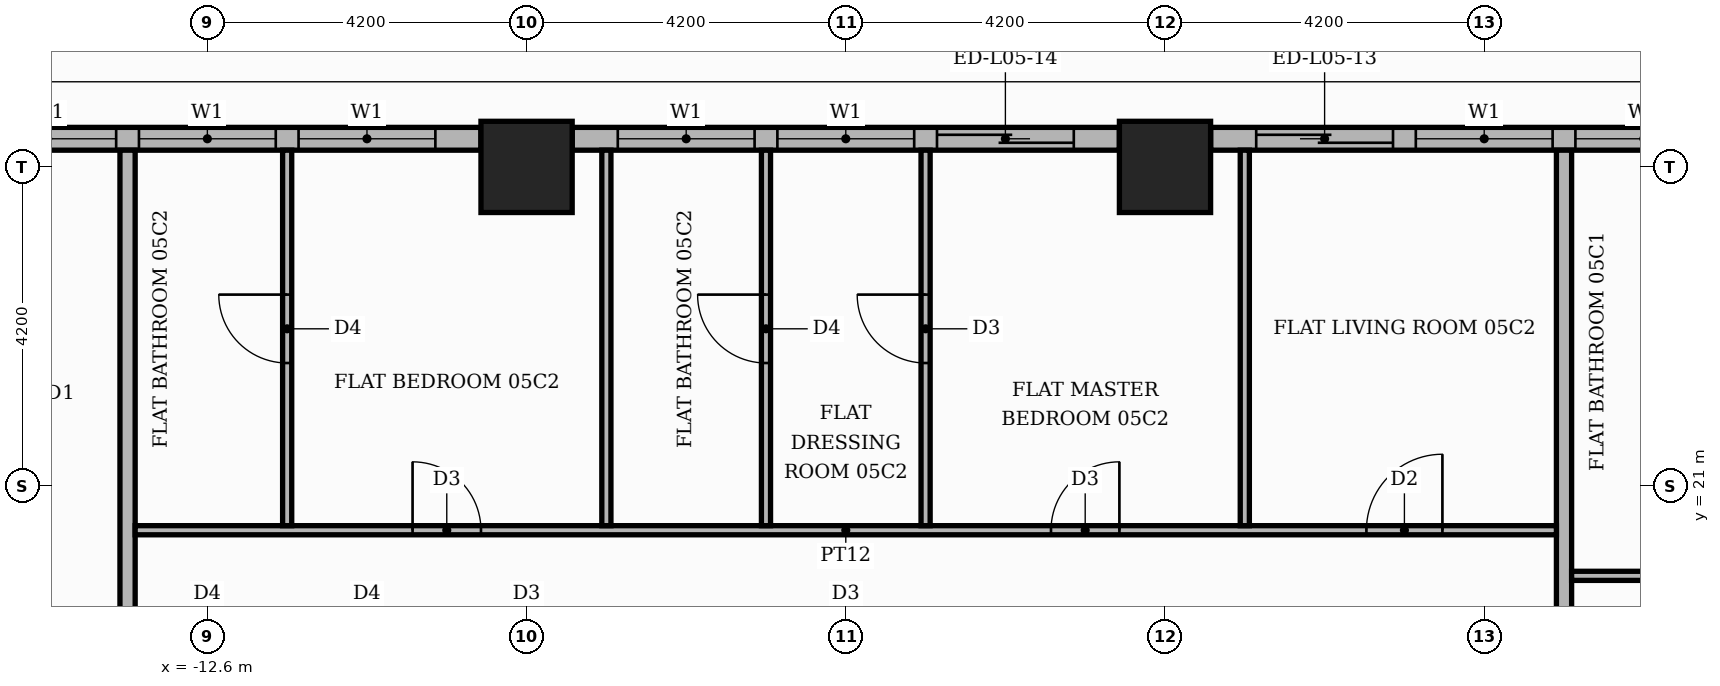
"""IFC4 building model, lengths in metres.
Left out: names, types, materials, properties, quantities, classifications, styles, units other than length and angle.
Written with IfcOpenShell. Run it as: python <this file> out.ifc"""

import sys

from ifc_helpers import new_model, si_unit, direction, frame, frame_2d, origin, origin_2d, place, context, subcontext, project, spatial, rectangle, extrude, element, fill, save


model = new_model("IFC4")
c1 = context("Model", 3, precision=1e-05, world=origin(), true_north=direction((0.0, 1.0)))
c2 = subcontext(c1, "Body", "Model", "MODEL_VIEW")
j1 = project(units=[si_unit("LENGTHUNIT", "METRE"), si_unit("PLANEANGLEUNIT", "RADIAN")], contexts=[c1])
p1 = place(None, origin())
s1 = spatial("IfcSite", under=j1, at=p1, CompositionType="ELEMENT")
p2 = place(p1, origin())
s2 = spatial("IfcBuilding", under=s1, at=p2, CompositionType="ELEMENT")
p3 = place(p2, frame((0.0, 0.0, 27.0)))
s3 = spatial("IfcBuildingStorey", under=s2, at=p3, CompositionType="ELEMENT", Elevation=27.0)
for number, where, z_axis, x_axis in (
    (1, (0.0, 25.2, 0.0), (0.0, 0.0, 1.0), (1.0, 0.0, 0.0)),
    (2, (-8.4, 25.2, 0.0), (0.0, 0.0, 1.0), (1.0, 0.0, 0.0)),
):
    element("IfcColumn", number, at=place(p3, frame(where, z_axis=z_axis, x_axis=x_axis)), inside=s3, PredefinedType="COLUMN", context=c2, shape_type="SweptSolid", body=[
        extrude(rectangle(XDim=1.2, YDim=1.2, at=origin_2d()), origin(), (0.0, 0.0, 1.0), 3.9),
    ])
p4 = place(p3, frame((7.8, 25.57, 0.0), z_axis=(0.0, 0.0, 1.0), x_axis=(-1.0, 0.0, 0.0)))
e3 = element("IfcWall", 3, at=p4, inside=s3, PredefinedType="STANDARD", context=c2, shape_type="SweptSolid", body=[
    extrude(rectangle(XDim=7.2, YDim=0.3, at=frame_2d((3.6, 0.0))), origin(), (0.0, 0.0, 1.0), 3.48),
])
p5 = place(p4, frame((0.6, 0.0, 0.9)))
e4 = element("IfcOpeningElement", 4, at=p5, cuts=e3, PredefinedType="OPENING", context=c2, shape_type="SweptSolid", body=[
    extrude(rectangle(XDim=1.8, YDim=2.1, at=frame_2d((0.9, 1.05))), frame((0.0, 0.16, 0.0), z_axis=(0.0, -1.0, 0.0), x_axis=(1.0, 0.0, 0.0)), (0.0, 0.0, 1.0), 0.32),
])
p6 = place(p4, frame((2.7, 0.0, 0.9)))
e5 = element("IfcOpeningElement", 5, at=p6, cuts=e3, PredefinedType="OPENING", context=c2, shape_type="SweptSolid", body=[
    extrude(rectangle(XDim=1.8, YDim=2.1, at=frame_2d((0.9, 1.05))), frame((0.0, 0.16, 0.0), z_axis=(0.0, -1.0, 0.0), x_axis=(1.0, 0.0, 0.0)), (0.0, 0.0, 1.0), 0.32),
])
p7 = place(p4, frame((4.8, 0.0, 0.0)))
e6 = element("IfcOpeningElement", 6, at=p7, cuts=e3, PredefinedType="OPENING", context=c2, shape_type="SweptSolid", body=[
    extrude(rectangle(XDim=1.8, YDim=2.4, at=frame_2d((0.9, 1.2))), frame((0.0, 0.16, 0.0), z_axis=(0.0, -1.0, 0.0), x_axis=(1.0, 0.0, 0.0)), (0.0, 0.0, 1.0), 0.32),
])
p8 = place(p3, frame((-0.6, 25.57, 0.0), z_axis=(0.0, 0.0, 1.0), x_axis=(-1.0, 0.0, 0.0)))
e7 = element("IfcWall", 7, at=p8, inside=s3, PredefinedType="STANDARD", context=c2, shape_type="SweptSolid", body=[
    extrude(rectangle(XDim=7.2, YDim=0.3, at=frame_2d((3.6, 0.0))), origin(), (0.0, 0.0, 1.0), 3.48),
])
p9 = place(p8, frame((0.6, 0.0, 0.0)))
e8 = element("IfcOpeningElement", 8, at=p9, cuts=e7, PredefinedType="OPENING", context=c2, shape_type="SweptSolid", body=[
    extrude(rectangle(XDim=1.8, YDim=2.4, at=frame_2d((0.9, 1.2))), frame((0.0, 0.16, 0.0), z_axis=(0.0, -1.0, 0.0), x_axis=(1.0, 0.0, 0.0)), (0.0, 0.0, 1.0), 0.32),
])
p10 = place(p8, frame((2.7, 0.0, 0.9)))
e9 = element("IfcOpeningElement", 9, at=p10, cuts=e7, PredefinedType="OPENING", context=c2, shape_type="SweptSolid", body=[
    extrude(rectangle(XDim=1.8, YDim=2.1, at=frame_2d((0.9, 1.05))), frame((0.0, 0.16, 0.0), z_axis=(0.0, -1.0, 0.0), x_axis=(1.0, 0.0, 0.0)), (0.0, 0.0, 1.0), 0.32),
])
p11 = place(p8, frame((4.8, 0.0, 0.9)))
e10 = element("IfcOpeningElement", 10, at=p11, cuts=e7, PredefinedType="OPENING", context=c2, shape_type="SweptSolid", body=[
    extrude(rectangle(XDim=1.8, YDim=2.1, at=frame_2d((0.9, 1.05))), frame((0.0, 0.16, 0.0), z_axis=(0.0, -1.0, 0.0), x_axis=(1.0, 0.0, 0.0)), (0.0, 0.0, 1.0), 0.32),
])
p12 = place(p3, frame((-9.0, 25.57, 0.0), z_axis=(0.0, 0.0, 1.0), x_axis=(-1.0, 0.0, 0.0)))
e11 = element("IfcWall", 11, at=p12, inside=s3, PredefinedType="STANDARD", context=c2, shape_type="SweptSolid", body=[
    extrude(rectangle(XDim=7.2, YDim=0.3, at=frame_2d((3.6, 0.0))), origin(), (0.0, 0.0, 1.0), 3.48),
])
p13 = place(p12, frame((0.6, 0.0, 0.9)))
e12 = element("IfcOpeningElement", 12, at=p13, cuts=e11, PredefinedType="OPENING", context=c2, shape_type="SweptSolid", body=[
    extrude(rectangle(XDim=1.8, YDim=2.1, at=frame_2d((0.9, 1.05))), frame((0.0, 0.16, 0.0), z_axis=(0.0, -1.0, 0.0), x_axis=(1.0, 0.0, 0.0)), (0.0, 0.0, 1.0), 0.32),
])
p14 = place(p12, frame((2.7, 0.0, 0.9)))
e13 = element("IfcOpeningElement", 13, at=p14, cuts=e11, PredefinedType="OPENING", context=c2, shape_type="SweptSolid", body=[
    extrude(rectangle(XDim=1.8, YDim=2.1, at=frame_2d((0.9, 1.05))), frame((0.0, 0.16, 0.0), z_axis=(0.0, -1.0, 0.0), x_axis=(1.0, 0.0, 0.0)), (0.0, 0.0, 1.0), 0.32),
])
p15 = place(p12, frame((4.8, 0.0, 0.9)))
e14 = element("IfcOpeningElement", 14, at=p15, cuts=e11, PredefinedType="OPENING", context=c2, shape_type="SweptSolid", body=[
    extrude(rectangle(XDim=1.8, YDim=2.1, at=frame_2d((0.9, 1.05))), frame((0.0, 0.16, 0.0), z_axis=(0.0, -1.0, 0.0), x_axis=(1.0, 0.0, 0.0)), (0.0, 0.0, 1.0), 0.32),
])
for number, where, z_axis, x_axis in (
    (15, (-13.65, 13.75, 0.0), (0.0, 0.0, 1.0), (0.0, 1.0, 0.0)),
    (16, (5.25, 13.75, 0.0), (0.0, 0.0, 1.0), (0.0, 1.0, 0.0)),
):
    element("IfcWall", number, at=place(p3, frame(where, z_axis=z_axis, x_axis=x_axis)), inside=s3, PredefinedType="PARTITIONING", context=c2, shape_type="SweptSolid", body=[
        extrude(rectangle(XDim=11.67, YDim=0.2, at=frame_2d((5.835, 0.0))), origin(), (0.0, 0.0, 1.0), 3.48),
    ])
p16 = place(p3, frame((5.35, 19.82, 0.0), z_axis=(0.0, 0.0, 1.0), x_axis=(1.0, 0.0, 0.0)))
e17 = element("IfcWall", 17, at=p16, inside=s3, PredefinedType="PARTITIONING", context=c2, shape_type="SweptSolid", body=[
    extrude(rectangle(XDim=11.95, YDim=0.12, at=frame_2d((5.975, 0.0))), origin(), (0.0, 0.0, 1.0), 3.48),
])
p17 = place(p16, frame((8.85, 0.0, 0.0)))
e18 = element("IfcOpeningElement", 18, at=p17, cuts=e17, PredefinedType="OPENING", context=c2, shape_type="SweptSolid", body=[
    extrude(rectangle(XDim=1.0, YDim=2.1, at=frame_2d((0.5, 1.05))), frame((0.0, 0.07, 0.0), z_axis=(0.0, -1.0, 0.0), x_axis=(1.0, 0.0, 0.0)), (0.0, 0.0, 1.0), 0.14),
])
p18 = place(p16, frame((5.75, 0.0, 0.0)))
e19 = element("IfcOpeningElement", 19, at=p18, cuts=e17, PredefinedType="OPENING", context=c2, shape_type="SweptSolid", body=[
    extrude(rectangle(XDim=0.9, YDim=2.1, at=frame_2d((0.45, 1.05))), frame((0.0, 0.07, 0.0), z_axis=(0.0, -1.0, 0.0), x_axis=(1.0, 0.0, 0.0)), (0.0, 0.0, 1.0), 0.14),
])
p19 = place(p3, frame((-13.55, 20.42, 0.0), z_axis=(0.0, 0.0, 1.0), x_axis=(1.0, 0.0, 0.0)))
e20 = element("IfcWall", 20, at=p19, inside=s3, PredefinedType="PARTITIONING", context=c2, shape_type="SweptSolid", body=[
    extrude(rectangle(XDim=18.7, YDim=0.12, at=frame_2d((9.35, 0.0))), origin(), (0.0, 0.0, 1.0), 3.48),
])
p20 = place(p19, frame((16.2, 0.0, 0.0)))
e21 = element("IfcOpeningElement", 21, at=p20, cuts=e20, PredefinedType="OPENING", context=c2, shape_type="SweptSolid", body=[
    extrude(rectangle(XDim=1.0, YDim=2.1, at=frame_2d((0.5, 1.05))), frame((0.0, 0.07, 0.0), z_axis=(0.0, -1.0, 0.0), x_axis=(1.0, 0.0, 0.0)), (0.0, 0.0, 1.0), 0.14),
])
p21 = place(p19, frame((12.05, 0.0, 0.0)))
e22 = element("IfcOpeningElement", 22, at=p21, cuts=e20, PredefinedType="OPENING", context=c2, shape_type="SweptSolid", body=[
    extrude(rectangle(XDim=0.9, YDim=2.1, at=frame_2d((0.45, 1.05))), frame((0.0, 0.07, 0.0), z_axis=(0.0, -1.0, 0.0), x_axis=(1.0, 0.0, 0.0)), (0.0, 0.0, 1.0), 0.14),
])
p22 = place(p19, frame((3.65, 0.0, 0.0)))
e23 = element("IfcOpeningElement", 23, at=p22, cuts=e20, PredefinedType="OPENING", context=c2, shape_type="SweptSolid", body=[
    extrude(rectangle(XDim=0.9, YDim=2.1, at=frame_2d((0.45, 1.05))), frame((0.0, 0.07, 0.0), z_axis=(0.0, -1.0, 0.0), x_axis=(1.0, 0.0, 0.0)), (0.0, 0.0, 1.0), 0.14),
])
p23 = place(p3, frame((-11.55, 20.48, 0.0), z_axis=(0.0, 0.0, 1.0), x_axis=(0.0, 1.0, 0.0)))
e24 = element("IfcWall", 24, at=p23, inside=s3, PredefinedType="PARTITIONING", context=c2, shape_type="SweptSolid", body=[
    extrude(rectangle(XDim=4.94, YDim=0.12, at=frame_2d((2.47, 0.0))), origin(), (0.0, 0.0, 1.0), 3.48),
])
p24 = place(p23, frame((2.14, 0.0, 0.0)))
e25 = element("IfcOpeningElement", 25, at=p24, cuts=e24, PredefinedType="OPENING", context=c2, shape_type="SweptSolid", body=[
    extrude(rectangle(XDim=0.9, YDim=2.1, at=frame_2d((0.45, 1.05))), frame((0.0, 0.07, 0.0), z_axis=(0.0, -1.0, 0.0), x_axis=(1.0, 0.0, 0.0)), (0.0, 0.0, 1.0), 0.14),
])
p25 = place(p3, frame((-7.35, 20.48, 0.0), z_axis=(0.0, 0.0, 1.0), x_axis=(0.0, 1.0, 0.0)))
e26 = element("IfcWall", 26, at=p25, inside=s3, PredefinedType="PARTITIONING", context=c2, shape_type="SweptSolid", body=[
    extrude(rectangle(XDim=4.94, YDim=0.12, at=frame_2d((2.47, 0.0))), origin(), (0.0, 0.0, 1.0), 3.48),
])
p26 = place(p3, frame((-5.25, 20.48, 0.0), z_axis=(0.0, 0.0, 1.0), x_axis=(0.0, 1.0, 0.0)))
e27 = element("IfcWall", 27, at=p26, inside=s3, PredefinedType="PARTITIONING", context=c2, shape_type="SweptSolid", body=[
    extrude(rectangle(XDim=4.94, YDim=0.12, at=frame_2d((2.47, 0.0))), origin(), (0.0, 0.0, 1.0), 3.48),
])
p27 = place(p26, frame((2.14, 0.0, 0.0)))
e28 = element("IfcOpeningElement", 28, at=p27, cuts=e27, PredefinedType="OPENING", context=c2, shape_type="SweptSolid", body=[
    extrude(rectangle(XDim=0.9, YDim=2.1, at=frame_2d((0.45, 1.05))), frame((0.0, 0.07, 0.0), z_axis=(0.0, -1.0, 0.0), x_axis=(1.0, 0.0, 0.0)), (0.0, 0.0, 1.0), 0.14),
])
p28 = place(p3, frame((-3.15, 20.48, 0.0), z_axis=(0.0, 0.0, 1.0), x_axis=(0.0, 1.0, 0.0)))
e29 = element("IfcWall", 29, at=p28, inside=s3, PredefinedType="PARTITIONING", context=c2, shape_type="SweptSolid", body=[
    extrude(rectangle(XDim=4.94, YDim=0.12, at=frame_2d((2.47, 0.0))), origin(), (0.0, 0.0, 1.0), 3.48),
])
p29 = place(p28, frame((2.14, 0.0, 0.0)))
e30 = element("IfcOpeningElement", 30, at=p29, cuts=e29, PredefinedType="OPENING", context=c2, shape_type="SweptSolid", body=[
    extrude(rectangle(XDim=0.9, YDim=2.1, at=frame_2d((0.45, 1.05))), frame((0.0, 0.07, 0.0), z_axis=(0.0, -1.0, 0.0), x_axis=(1.0, 0.0, 0.0)), (0.0, 0.0, 1.0), 0.14),
])
p30 = place(p3, frame((1.05, 20.48, 0.0), z_axis=(0.0, 0.0, 1.0), x_axis=(0.0, 1.0, 0.0)))
e31 = element("IfcWall", 31, at=p30, inside=s3, PredefinedType="PARTITIONING", context=c2, shape_type="SweptSolid", body=[
    extrude(rectangle(XDim=4.94, YDim=0.12, at=frame_2d((2.47, 0.0))), origin(), (0.0, 0.0, 1.0), 3.48),
])
p31 = place(p5, origin())
e32 = element("IfcWindow", 32, at=p31, inside=s3, PartitioningType="SINGLE_PANEL", PredefinedType="WINDOW", context=c2, shape_type="SweptSolid", body=[
    extrude(rectangle(XDim=1.8, YDim=2.1, at=frame_2d((0.9, 1.05))), frame((0.0, 0.03, 0.0), z_axis=(0.0, -1.0, 0.0), x_axis=(1.0, 0.0, 0.0)), (0.0, 0.0, 1.0), 0.06),
])
fill(e4, e32)
p32 = place(p6, origin())
e33 = element("IfcWindow", 33, at=p32, inside=s3, PartitioningType="SINGLE_PANEL", PredefinedType="WINDOW", context=c2, shape_type="SweptSolid", body=[
    extrude(rectangle(XDim=1.8, YDim=2.1, at=frame_2d((0.9, 1.05))), frame((0.0, 0.03, 0.0), z_axis=(0.0, -1.0, 0.0), x_axis=(1.0, 0.0, 0.0)), (0.0, 0.0, 1.0), 0.06),
])
fill(e5, e33)
p33 = place(p7, origin())
e34 = element("IfcDoor", 34, at=p33, inside=s3, OperationType="SLIDING_TO_RIGHT", PredefinedType="DOOR", context=c2, shape_type="SweptSolid", body=[
    extrude(rectangle(XDim=1.8, YDim=2.4, at=frame_2d((0.9, 1.2))), frame((0.0, 0.025, 0.0), z_axis=(0.0, -1.0, 0.0), x_axis=(1.0, 0.0, 0.0)), (0.0, 0.0, 1.0), 0.05),
])
fill(e6, e34)
p34 = place(p9, origin())
e35 = element("IfcDoor", 35, at=p34, inside=s3, OperationType="SLIDING_TO_LEFT", PredefinedType="DOOR", context=c2, shape_type="SweptSolid", body=[
    extrude(rectangle(XDim=1.8, YDim=2.4, at=frame_2d((0.9, 1.2))), frame((0.0, 0.025, 0.0), z_axis=(0.0, -1.0, 0.0), x_axis=(1.0, 0.0, 0.0)), (0.0, 0.0, 1.0), 0.05),
])
fill(e8, e35)
p35 = place(p10, origin())
e36 = element("IfcWindow", 36, at=p35, inside=s3, PartitioningType="SINGLE_PANEL", PredefinedType="WINDOW", context=c2, shape_type="SweptSolid", body=[
    extrude(rectangle(XDim=1.8, YDim=2.1, at=frame_2d((0.9, 1.05))), frame((0.0, 0.03, 0.0), z_axis=(0.0, -1.0, 0.0), x_axis=(1.0, 0.0, 0.0)), (0.0, 0.0, 1.0), 0.06),
])
fill(e9, e36)
p36 = place(p11, origin())
e37 = element("IfcWindow", 37, at=p36, inside=s3, PartitioningType="SINGLE_PANEL", PredefinedType="WINDOW", context=c2, shape_type="SweptSolid", body=[
    extrude(rectangle(XDim=1.8, YDim=2.1, at=frame_2d((0.9, 1.05))), frame((0.0, 0.03, 0.0), z_axis=(0.0, -1.0, 0.0), x_axis=(1.0, 0.0, 0.0)), (0.0, 0.0, 1.0), 0.06),
])
fill(e10, e37)
p37 = place(p13, origin())
e38 = element("IfcWindow", 38, at=p37, inside=s3, PartitioningType="SINGLE_PANEL", PredefinedType="WINDOW", context=c2, shape_type="SweptSolid", body=[
    extrude(rectangle(XDim=1.8, YDim=2.1, at=frame_2d((0.9, 1.05))), frame((0.0, 0.03, 0.0), z_axis=(0.0, -1.0, 0.0), x_axis=(1.0, 0.0, 0.0)), (0.0, 0.0, 1.0), 0.06),
])
fill(e12, e38)
p38 = place(p14, origin())
e39 = element("IfcWindow", 39, at=p38, inside=s3, PartitioningType="SINGLE_PANEL", PredefinedType="WINDOW", context=c2, shape_type="SweptSolid", body=[
    extrude(rectangle(XDim=1.8, YDim=2.1, at=frame_2d((0.9, 1.05))), frame((0.0, 0.03, 0.0), z_axis=(0.0, -1.0, 0.0), x_axis=(1.0, 0.0, 0.0)), (0.0, 0.0, 1.0), 0.06),
])
fill(e13, e39)
p39 = place(p15, origin())
e40 = element("IfcWindow", 40, at=p39, inside=s3, PartitioningType="SINGLE_PANEL", PredefinedType="WINDOW", context=c2, shape_type="SweptSolid", body=[
    extrude(rectangle(XDim=1.8, YDim=2.1, at=frame_2d((0.9, 1.05))), frame((0.0, 0.03, 0.0), z_axis=(0.0, -1.0, 0.0), x_axis=(1.0, 0.0, 0.0)), (0.0, 0.0, 1.0), 0.06),
])
fill(e14, e40)
p40 = place(p20, origin())
e41 = element("IfcDoor", 41, at=p40, inside=s3, OperationType="SINGLE_SWING_RIGHT", PredefinedType="DOOR", context=c2, shape_type="SweptSolid", body=[
    extrude(rectangle(XDim=1.0, YDim=2.1, at=frame_2d((0.5, 1.05))), frame((0.0, 0.025, 0.0), z_axis=(0.0, -1.0, 0.0), x_axis=(1.0, 0.0, 0.0)), (0.0, 0.0, 1.0), 0.05),
])
fill(e21, e41)
p41 = place(p21, origin())
e42 = element("IfcDoor", 42, at=p41, inside=s3, OperationType="SINGLE_SWING_RIGHT", PredefinedType="DOOR", context=c2, shape_type="SweptSolid", body=[
    extrude(rectangle(XDim=0.9, YDim=2.1, at=frame_2d((0.45, 1.05))), frame((0.0, 0.025, 0.0), z_axis=(0.0, -1.0, 0.0), x_axis=(1.0, 0.0, 0.0)), (0.0, 0.0, 1.0), 0.05),
])
fill(e22, e42)
p42 = place(p29, origin())
e43 = element("IfcDoor", 43, at=p42, inside=s3, OperationType="SINGLE_SWING_RIGHT", PredefinedType="DOOR", context=c2, shape_type="SweptSolid", body=[
    extrude(rectangle(XDim=0.9, YDim=2.1, at=frame_2d((0.45, 1.05))), frame((0.0, 0.025, 0.0), z_axis=(0.0, -1.0, 0.0), x_axis=(1.0, 0.0, 0.0)), (0.0, 0.0, 1.0), 0.05),
])
fill(e30, e43)
p43 = place(p27, origin())
e44 = element("IfcDoor", 44, at=p43, inside=s3, OperationType="SINGLE_SWING_RIGHT", PredefinedType="DOOR", context=c2, shape_type="SweptSolid", body=[
    extrude(rectangle(XDim=0.9, YDim=2.1, at=frame_2d((0.45, 1.05))), frame((0.0, 0.025, 0.0), z_axis=(0.0, -1.0, 0.0), x_axis=(1.0, 0.0, 0.0)), (0.0, 0.0, 1.0), 0.05),
])
fill(e28, e44)
p44 = place(p22, origin())
e45 = element("IfcDoor", 45, at=p44, inside=s3, OperationType="SINGLE_SWING_LEFT", PredefinedType="DOOR", context=c2, shape_type="SweptSolid", body=[
    extrude(rectangle(XDim=0.9, YDim=2.1, at=frame_2d((0.45, 1.05))), frame((0.0, 0.025, 0.0), z_axis=(0.0, -1.0, 0.0), x_axis=(1.0, 0.0, 0.0)), (0.0, 0.0, 1.0), 0.05),
])
fill(e23, e45)
p45 = place(p24, origin())
e46 = element("IfcDoor", 46, at=p45, inside=s3, OperationType="SINGLE_SWING_RIGHT", PredefinedType="DOOR", context=c2, shape_type="SweptSolid", body=[
    extrude(rectangle(XDim=0.9, YDim=2.1, at=frame_2d((0.45, 1.05))), frame((0.0, 0.025, 0.0), z_axis=(0.0, -1.0, 0.0), x_axis=(1.0, 0.0, 0.0)), (0.0, 0.0, 1.0), 0.05),
])
fill(e25, e46)
save(model, sys.argv[1])
